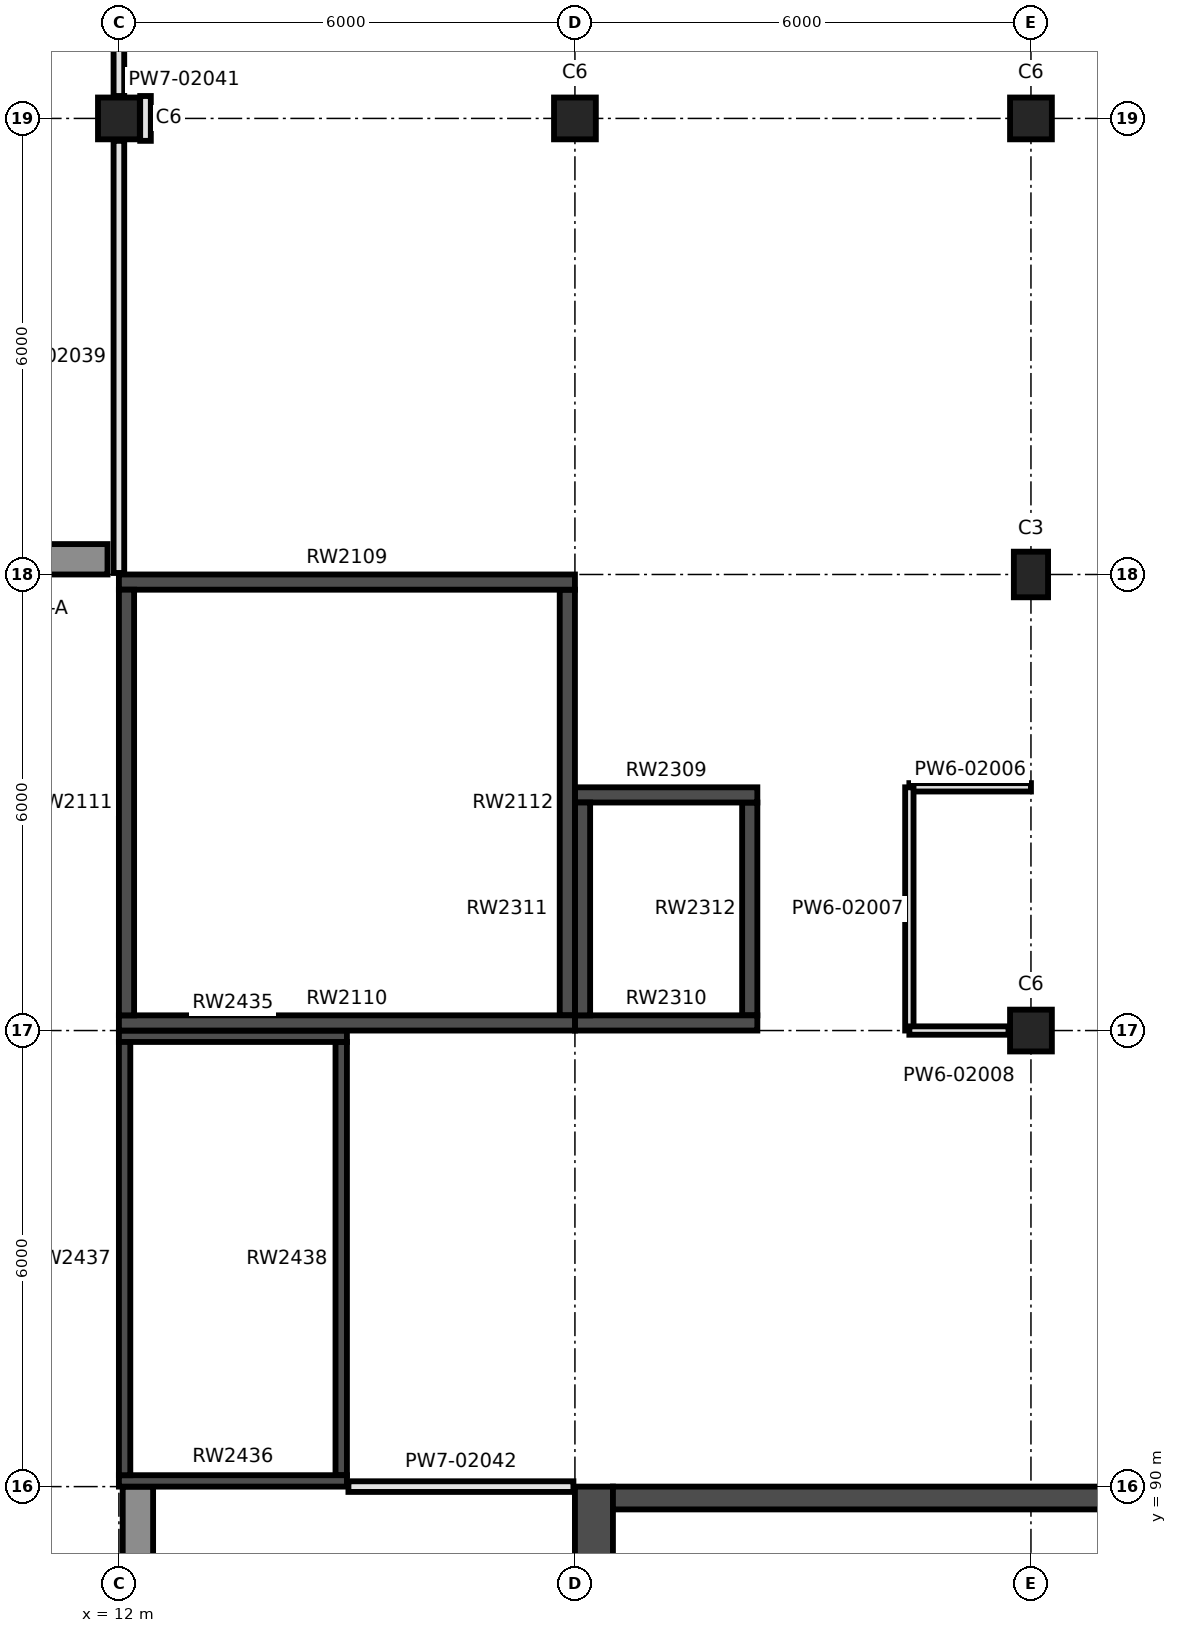
"""IFC4 building model, lengths in metres.
Left out: names, types, materials, properties, quantities, classifications, styles, units other than length and angle.
Written with IfcOpenShell. Run it as: python <this file> out.ifc"""

import sys

from ifc_helpers import new_model, si_unit, direction, frame, frame_2d, origin, origin_2d, place, context, subcontext, project, spatial, rectangle, extrude, element, fill, save


model = new_model("IFC4")
c1 = context("Model", 3, precision=1e-05, world=origin(), true_north=direction((0.0, 1.0)))
c2 = subcontext(c1, "Body", "Model", "MODEL_VIEW")
j1 = project(units=[si_unit("LENGTHUNIT", "METRE"), si_unit("PLANEANGLEUNIT", "RADIAN")], contexts=[c1])
p1 = place(None, origin())
s1 = spatial("IfcSite", under=j1, at=p1, CompositionType="ELEMENT")
p2 = place(p1, origin())
s2 = spatial("IfcBuilding", under=s1, at=p2, CompositionType="ELEMENT")
p3 = place(p2, frame((0.0, 0.0, 12.0)))
s3 = spatial("IfcBuildingStorey", under=s2, at=p3, CompositionType="ELEMENT", Elevation=12.0)
p4 = place(p3, frame((24.0, 96.0, 0.0), z_axis=(0.0, 0.0, 1.0), x_axis=(1.0, 0.0, 0.0)))
e1 = element("IfcColumn", 1, at=p4, inside=s3, PredefinedType="COLUMN", context=c2, shape_type="SweptSolid", body=[
    extrude(rectangle(XDim=0.55, YDim=0.55, at=origin_2d()), origin(), (0.0, 0.0, 1.0), 4.5),
])
p5 = place(p3, frame((24.0, 102.0, 0.0), z_axis=(0.0, 0.0, 1.0), x_axis=(1.0, 0.0, 0.0)))
e2 = element("IfcColumn", 2, at=p5, inside=s3, PredefinedType="COLUMN", context=c2, shape_type="SweptSolid", body=[
    extrude(rectangle(XDim=0.45, YDim=0.6, at=origin_2d()), origin(), (0.0, 0.0, 1.0), 4.5),
])
p6 = place(p3, frame((12.0, 108.0, 0.0), z_axis=(0.0, 0.0, 1.0), x_axis=(1.0, 0.0, 0.0)))
e3 = element("IfcColumn", 3, at=p6, inside=s3, PredefinedType="COLUMN", context=c2, shape_type="SweptSolid", body=[
    extrude(rectangle(XDim=0.55, YDim=0.55, at=origin_2d()), origin(), (0.0, 0.0, 1.0), 4.25),
])
for number, where, z_axis, x_axis in (
    (4, (18.0, 108.0, 0.0), (0.0, 0.0, 1.0), (1.0, 0.0, 0.0)),
    (5, (24.0, 108.0, 0.0), (0.0, 0.0, 1.0), (1.0, 0.0, 0.0)),
):
    element("IfcColumn", number, at=place(p3, frame(where, z_axis=z_axis, x_axis=x_axis)), inside=s3, PredefinedType="COLUMN", context=c2, shape_type="SweptSolid", body=[
        extrude(rectangle(XDim=0.55, YDim=0.55, at=origin_2d()), origin(), (0.0, 0.0, 1.0), 4.5),
    ])
p7 = place(p3, frame((12.0, 101.9, 0.0), z_axis=(0.0, 0.0, 1.0), x_axis=(1.0, 0.0, 0.0)))
e6 = element("IfcWall", 6, at=p7, inside=s3, PredefinedType="SHEAR", context=c2, shape_type="SweptSolid", body=[
    extrude(rectangle(XDim=6.0, YDim=0.2, at=frame_2d((3.0, 0.0))), origin(), (0.0, 0.0, 1.0), 4.5),
])
p8 = place(p7, frame((2.1, 0.0, 0.0)))
e7 = element("IfcOpeningElement", 7, at=p8, cuts=e6, PredefinedType="OPENING", context=c2, shape_type="SweptSolid", body=[
    extrude(rectangle(XDim=1.8, YDim=2.2, at=frame_2d((0.9, 1.1))), frame((0.0, 0.11, 0.0), z_axis=(0.0, -1.0, 0.0), x_axis=(1.0, 0.0, 0.0)), (0.0, 0.0, 1.0), 0.22),
])
p9 = place(p3, frame((12.0, 96.1, 0.0), z_axis=(0.0, 0.0, 1.0), x_axis=(1.0, 0.0, 0.0)))
e8 = element("IfcWall", 8, at=p9, inside=s3, PredefinedType="SHEAR", context=c2, shape_type="SweptSolid", body=[
    extrude(rectangle(XDim=6.0, YDim=0.2, at=frame_2d((3.0, 0.0))), origin(), (0.0, 0.0, 1.0), 4.5),
])
p10 = place(p3, frame((12.1, 96.2, 0.0), z_axis=(0.0, 0.0, 1.0), x_axis=(0.0, 1.0, 0.0)))
e9 = element("IfcWall", 9, at=p10, inside=s3, PredefinedType="SHEAR", context=c2, shape_type="SweptSolid", body=[
    extrude(rectangle(XDim=5.6, YDim=0.2, at=frame_2d((2.8, 0.0))), origin(), (0.0, 0.0, 1.0), 4.5),
])
p11 = place(p10, frame((2.55, 0.0, 0.9)))
e10 = element("IfcOpeningElement", 10, at=p11, cuts=e9, PredefinedType="OPENING", context=c2, shape_type="SweptSolid", body=[
    extrude(rectangle(XDim=0.5, YDim=2.1, at=frame_2d((0.25, 1.05))), frame((0.0, 0.11, 0.0), z_axis=(0.0, -1.0, 0.0), x_axis=(1.0, 0.0, 0.0)), (0.0, 0.0, 1.0), 0.22),
])
p12 = place(p3, frame((17.9, 96.2, 0.0), z_axis=(0.0, 0.0, 1.0), x_axis=(0.0, 1.0, 0.0)))
e11 = element("IfcWall", 11, at=p12, inside=s3, PredefinedType="SHEAR", context=c2, shape_type="SweptSolid", body=[
    extrude(rectangle(XDim=5.6, YDim=0.2, at=frame_2d((2.8, 0.0))), origin(), (0.0, 0.0, 1.0), 4.5),
])
p13 = place(p3, frame((18.0, 99.1, 0.0), z_axis=(0.0, 0.0, 1.0), x_axis=(1.0, 0.0, 0.0)))
e12 = element("IfcWall", 12, at=p13, inside=s3, PredefinedType="SHEAR", context=c2, shape_type="SweptSolid", body=[
    extrude(rectangle(XDim=2.4, YDim=0.2, at=frame_2d((1.2, 0.0))), origin(), (0.0, 0.0, 1.0), 4.5),
])
p14 = place(p13, frame((0.65, 0.0, 0.0)))
e13 = element("IfcOpeningElement", 13, at=p14, cuts=e12, PredefinedType="OPENING", context=c2, shape_type="SweptSolid", body=[
    extrude(rectangle(XDim=1.1, YDim=2.1, at=frame_2d((0.55, 1.05))), frame((0.0, 0.11, 0.0), z_axis=(0.0, -1.0, 0.0), x_axis=(1.0, 0.0, 0.0)), (0.0, 0.0, 1.0), 0.22),
])
p15 = place(p3, frame((18.0, 96.1, 0.0), z_axis=(0.0, 0.0, 1.0), x_axis=(1.0, 0.0, 0.0)))
e14 = element("IfcWall", 14, at=p15, inside=s3, PredefinedType="SHEAR", context=c2, shape_type="SweptSolid", body=[
    extrude(rectangle(XDim=2.4, YDim=0.2, at=frame_2d((1.2, 0.0))), origin(), (0.0, 0.0, 1.0), 4.5),
])
for number, where, z_axis, x_axis in (
    (15, (18.1, 96.2, 0.0), (0.0, 0.0, 1.0), (0.0, 1.0, 0.0)),
    (16, (20.3, 96.2, 0.0), (0.0, 0.0, 1.0), (0.0, 1.0, 0.0)),
):
    element("IfcWall", number, at=place(p3, frame(where, z_axis=z_axis, x_axis=x_axis)), inside=s3, PredefinedType="SHEAR", context=c2, shape_type="SweptSolid", body=[
        extrude(rectangle(XDim=2.8, YDim=0.2, at=frame_2d((1.4, 0.0))), origin(), (0.0, 0.0, 1.0), 4.5),
    ])
for number, where, z_axis, x_axis in (
    (17, (12.0, 95.925, 0.0), (0.0, 0.0, 1.0), (1.0, 0.0, 0.0)),
    (18, (12.0, 90.075, 0.0), (0.0, 0.0, 1.0), (1.0, 0.0, 0.0)),
):
    element("IfcWall", number, at=place(p3, frame(where, z_axis=z_axis, x_axis=x_axis)), inside=s3, PredefinedType="SHEAR", context=c2, shape_type="SweptSolid", body=[
        extrude(rectangle(XDim=3.0, YDim=0.15, at=frame_2d((1.5, 0.0))), origin(), (0.0, 0.0, 1.0), 4.5),
    ])
for number, where, z_axis, x_axis in (
    (19, (12.075, 90.15, 0.0), (0.0, 0.0, 1.0), (0.0, 1.0, 0.0)),
    (20, (14.925, 90.15, 0.0), (0.0, 0.0, 1.0), (0.0, 1.0, 0.0)),
):
    element("IfcWall", number, at=place(p3, frame(where, z_axis=z_axis, x_axis=x_axis)), inside=s3, PredefinedType="SHEAR", context=c2, shape_type="SweptSolid", body=[
        extrude(rectangle(XDim=5.7, YDim=0.15, at=frame_2d((2.85, 0.0))), origin(), (0.0, 0.0, 1.0), 4.5),
    ])
p16 = place(p3, frame((18.25, 54.5, 0.0), z_axis=(0.0, 0.0, 1.0), x_axis=(0.0, 1.0, 0.0)))
e21 = element("IfcWall", 21, at=p16, inside=s3, PredefinedType="SHEAR", context=c2, shape_type="SweptSolid", body=[
    extrude(rectangle(XDim=35.5, YDim=0.5, at=frame_2d((17.75, 0.0))), origin(), (0.0, 0.0, 1.0), 4.5),
])
p17 = place(p16, frame((25.35, 0.0, 0.0)))
e22 = element("IfcOpeningElement", 22, at=p17, cuts=e21, PredefinedType="OPENING", context=c2, shape_type="SweptSolid", body=[
    extrude(rectangle(XDim=1.3, YDim=2.1, at=frame_2d((0.65, 1.05))), frame((0.0, 0.26, 0.0), z_axis=(0.0, -1.0, 0.0), x_axis=(1.0, 0.0, 0.0)), (0.0, 0.0, 1.0), 0.52),
])
p18 = place(p3, frame((18.5, 89.85, 0.0), z_axis=(0.0, 0.0, 1.0), x_axis=(1.0, 0.0, 0.0)))
e23 = element("IfcWall", 23, at=p18, inside=s3, PredefinedType="SHEAR", context=c2, shape_type="SweptSolid", body=[
    extrude(rectangle(XDim=29.0, YDim=0.3, at=frame_2d((14.5, 0.0))), origin(), (0.0, 0.0, 1.0), 4.5),
])
p19 = place(p3, frame((12.25, 84.0, 0.0), z_axis=(0.0, 0.0, 1.0), x_axis=(0.0, 1.0, 0.0)))
e24 = element("IfcWall", 24, at=p19, inside=s3, PredefinedType="SOLIDWALL", context=c2, shape_type="SweptSolid", body=[
    extrude(rectangle(XDim=6.0, YDim=0.4, at=frame_2d((3.0, 0.0))), origin(), (0.0, 0.0, 1.0), 3.55),
])
p20 = place(p3, frame((11.85, 102.2, 0.0), z_axis=(0.0, 0.0, 1.0), x_axis=(-1.0, 0.0, 0.0)))
e25 = element("IfcWall", 25, at=p20, inside=s3, PredefinedType="SOLIDWALL", context=c2, shape_type="SweptSolid", body=[
    extrude(rectangle(XDim=5.55, YDim=0.4, at=frame_2d((2.775, 0.0))), origin(), (0.0, 0.0, 1.0), 3.8),
])
p21 = place(p20, frame((1.575, 0.0, 0.9)))
e26 = element("IfcOpeningElement", 26, at=p21, cuts=e25, PredefinedType="OPENING", context=c2, shape_type="SweptSolid", body=[
    extrude(rectangle(XDim=2.4, YDim=2.45, at=frame_2d((1.2, 1.225))), frame((0.0, 0.21, 0.0), z_axis=(0.0, -1.0, 0.0), x_axis=(1.0, 0.0, 0.0)), (0.0, 0.0, 1.0), 0.42),
])
p22 = place(p3, frame((22.4, 99.2, 0.0), z_axis=(0.0, 0.0, 1.0), x_axis=(1.0, 0.0, 0.0)))
e27 = element("IfcWall", 27, at=p22, inside=s3, PredefinedType="PARTITIONING", context=c2, shape_type="SweptSolid", body=[
    extrude(rectangle(XDim=1.6, YDim=0.11, at=frame_2d((0.8, 0.0))), origin(), (0.0, 0.0, 1.0), 3.6),
])
p23 = place(p3, frame((22.4, 96.0, 0.0), z_axis=(0.0, 0.0, 1.0), x_axis=(0.0, 1.0, 0.0)))
e28 = element("IfcWall", 28, at=p23, inside=s3, PredefinedType="PARTITIONING", context=c2, shape_type="SweptSolid", body=[
    extrude(rectangle(XDim=3.2, YDim=0.11, at=frame_2d((1.6, 0.0))), origin(), (0.0, 0.0, 1.0), 3.65),
])
p24 = place(p23, frame((1.25, 0.0, 0.0)))
e29 = element("IfcOpeningElement", 29, at=p24, cuts=e28, PredefinedType="OPENING", context=c2, shape_type="SweptSolid", body=[
    extrude(rectangle(XDim=0.75, YDim=2.04, at=frame_2d((0.375, 1.02))), frame((0.0, 0.065, 0.0), z_axis=(0.0, -1.0, 0.0), x_axis=(1.0, 0.0, 0.0)), (0.0, 0.0, 1.0), 0.13),
])
p25 = place(p3, frame((22.4, 96.0, 0.0), z_axis=(0.0, 0.0, 1.0), x_axis=(1.0, 0.0, 0.0)))
e30 = element("IfcWall", 30, at=p25, inside=s3, PredefinedType="PARTITIONING", context=c2, shape_type="SweptSolid", body=[
    extrude(rectangle(XDim=1.305, YDim=0.11, at=frame_2d((0.653, 0.0))), origin(), (0.0, 0.0, 1.0), 3.65),
])
p26 = place(p3, frame((12.0, 108.295, 0.0), z_axis=(0.0, 0.0, 1.0), x_axis=(0.0, 1.0, 0.0)))
e31 = element("IfcWall", 31, at=p26, inside=s3, PredefinedType="PARTITIONING", context=c2, shape_type="SweptSolid", body=[
    extrude(rectangle(XDim=5.41, YDim=0.14, at=frame_2d((2.705, 0.0))), origin(), (0.0, 0.0, 1.0), 3.45),
])
p27 = place(p26, frame((0.255, 0.0, 0.0)))
e32 = element("IfcOpeningElement", 32, at=p27, cuts=e31, PredefinedType="OPENING", context=c2, shape_type="SweptSolid", body=[
    extrude(rectangle(XDim=1.8, YDim=2.1, at=frame_2d((0.9, 1.05))), frame((0.0, 0.08, 0.0), z_axis=(0.0, -1.0, 0.0), x_axis=(1.0, 0.0, 0.0)), (0.0, 0.0, 1.0), 0.16),
])
p28 = place(p3, frame((12.0, 102.02, 0.0), z_axis=(0.0, 0.0, 1.0), x_axis=(0.0, 1.0, 0.0)))
e33 = element("IfcWall", 33, at=p28, inside=s3, PredefinedType="PARTITIONING", context=c2, shape_type="SweptSolid", body=[
    extrude(rectangle(XDim=5.685, YDim=0.14, at=frame_2d((2.843, 0.0))), origin(), (0.0, 0.0, 1.0), 3.55),
])
p29 = place(p28, frame((2.03, 0.0, 0.0)))
e34 = element("IfcOpeningElement", 34, at=p29, cuts=e33, PredefinedType="OPENING", context=c2, shape_type="SweptSolid", body=[
    extrude(rectangle(XDim=1.8, YDim=2.1, at=frame_2d((0.9, 1.05))), frame((0.0, 0.08, 0.0), z_axis=(0.0, -1.0, 0.0), x_axis=(1.0, 0.0, 0.0)), (0.0, 0.0, 1.0), 0.16),
])
p30 = place(p3, frame((12.35, 107.705, 0.0), z_axis=(0.0, 0.0, 1.0), x_axis=(0.0, 1.0, 0.0)))
e35 = element("IfcWall", 35, at=p30, inside=s3, PredefinedType="PARTITIONING", context=c2, shape_type="SweptSolid", body=[
    extrude(rectangle(XDim=0.59, YDim=0.14, at=frame_2d((0.295, 0.0))), origin(), (0.0, 0.0, 1.0), 3.55),
])
p31 = place(p3, frame((15.02, 90.0, 0.0), z_axis=(0.0, 0.0, 1.0), x_axis=(1.0, 0.0, 0.0)))
e36 = element("IfcWall", 36, at=p31, inside=s3, PredefinedType="PARTITIONING", context=c2, shape_type="SweptSolid", body=[
    extrude(rectangle(XDim=2.96, YDim=0.14, at=frame_2d((1.48, 0.0))), origin(), (0.0, 0.0, 1.0), 3.65),
])
p32 = place(p31, frame((0.53, 0.0, 0.0)))
e37 = element("IfcOpeningElement", 37, at=p32, cuts=e36, PredefinedType="OPENING", context=c2, shape_type="SweptSolid", body=[
    extrude(rectangle(XDim=1.8, YDim=2.1, at=frame_2d((0.9, 1.05))), frame((0.0, 0.08, 0.0), z_axis=(0.0, -1.0, 0.0), x_axis=(1.0, 0.0, 0.0)), (0.0, 0.0, 1.0), 0.16),
])
p33 = place(p11, origin())
e38 = element("IfcWindow", 38, at=p33, inside=s3, PartitioningType="SINGLE_PANEL", PredefinedType="WINDOW", context=c2, shape_type="SweptSolid", body=[
    extrude(rectangle(XDim=0.5, YDim=2.1, at=frame_2d((0.25, 1.05))), frame((0.0, 0.03, 0.0), z_axis=(0.0, -1.0, 0.0), x_axis=(1.0, 0.0, 0.0)), (0.0, 0.0, 1.0), 0.06),
])
fill(e10, e38)
p34 = place(p8, frame((1.8, 0.0, 0.0), z_axis=(0.0, 0.0, 1.0), x_axis=(-1.0, 0.0, 0.0)))
e39 = element("IfcDoor", 39, at=p34, inside=s3, OperationType="DOUBLE_DOOR_SINGLE_SWING", PredefinedType="DOOR", context=c2, shape_type="SweptSolid", body=[
    extrude(rectangle(XDim=1.8, YDim=2.2, at=frame_2d((0.9, 1.1))), frame((0.0, 0.025, 0.0), z_axis=(0.0, -1.0, 0.0), x_axis=(1.0, 0.0, 0.0)), (0.0, 0.0, 1.0), 0.05),
])
fill(e7, e39)
p35 = place(p24, frame((0.75, 0.0, 0.0), z_axis=(0.0, 0.0, 1.0), x_axis=(-1.0, 0.0, 0.0)))
e40 = element("IfcDoor", 40, at=p35, inside=s3, OperationType="SINGLE_SWING_RIGHT", PredefinedType="DOOR", context=c2, shape_type="SweptSolid", body=[
    extrude(rectangle(XDim=0.75, YDim=2.04, at=frame_2d((0.375, 1.02))), frame((0.0, 0.025, 0.0), z_axis=(0.0, -1.0, 0.0), x_axis=(1.0, 0.0, 0.0)), (0.0, 0.0, 1.0), 0.05),
])
fill(e29, e40)
p36 = place(p29, frame((1.8, 0.0, 0.0), z_axis=(0.0, 0.0, 1.0), x_axis=(-1.0, 0.0, 0.0)))
e41 = element("IfcDoor", 41, at=p36, inside=s3, OperationType="DOUBLE_DOOR_SINGLE_SWING", PredefinedType="DOOR", context=c2, shape_type="SweptSolid", body=[
    extrude(rectangle(XDim=1.8, YDim=2.1, at=frame_2d((0.9, 1.05))), frame((0.0, 0.025, 0.0), z_axis=(0.0, -1.0, 0.0), x_axis=(1.0, 0.0, 0.0)), (0.0, 0.0, 1.0), 0.05),
])
fill(e34, e41)
p37 = place(p27, frame((1.8, 0.0, 0.0), z_axis=(0.0, 0.0, 1.0), x_axis=(-1.0, 0.0, 0.0)))
e42 = element("IfcDoor", 42, at=p37, inside=s3, OperationType="DOUBLE_DOOR_SINGLE_SWING", PredefinedType="DOOR", context=c2, shape_type="SweptSolid", body=[
    extrude(rectangle(XDim=1.8, YDim=2.1, at=frame_2d((0.9, 1.05))), frame((0.0, 0.025, 0.0), z_axis=(0.0, -1.0, 0.0), x_axis=(1.0, 0.0, 0.0)), (0.0, 0.0, 1.0), 0.05),
])
fill(e32, e42)
p38 = place(p32, frame((1.8, 0.0, 0.0), z_axis=(0.0, 0.0, 1.0), x_axis=(-1.0, 0.0, 0.0)))
e43 = element("IfcDoor", 43, at=p38, inside=s3, OperationType="DOUBLE_DOOR_SINGLE_SWING", PredefinedType="DOOR", context=c2, shape_type="SweptSolid", body=[
    extrude(rectangle(XDim=1.8, YDim=2.1, at=frame_2d((0.9, 1.05))), frame((0.0, 0.025, 0.0), z_axis=(0.0, -1.0, 0.0), x_axis=(1.0, 0.0, 0.0)), (0.0, 0.0, 1.0), 0.05),
])
fill(e37, e43)
p39 = place(p14, origin())
e44 = element("IfcDoor", 44, at=p39, inside=s3, OperationType="DOUBLE_DOOR_SLIDING", PredefinedType="DOOR", context=c2, shape_type="SweptSolid", body=[
    extrude(rectangle(XDim=1.1, YDim=2.1, at=frame_2d((0.55, 1.05))), frame((0.0, 0.025, 0.0), z_axis=(0.0, -1.0, 0.0), x_axis=(1.0, 0.0, 0.0)), (0.0, 0.0, 1.0), 0.05),
])
fill(e13, e44)
save(model, sys.argv[1])
